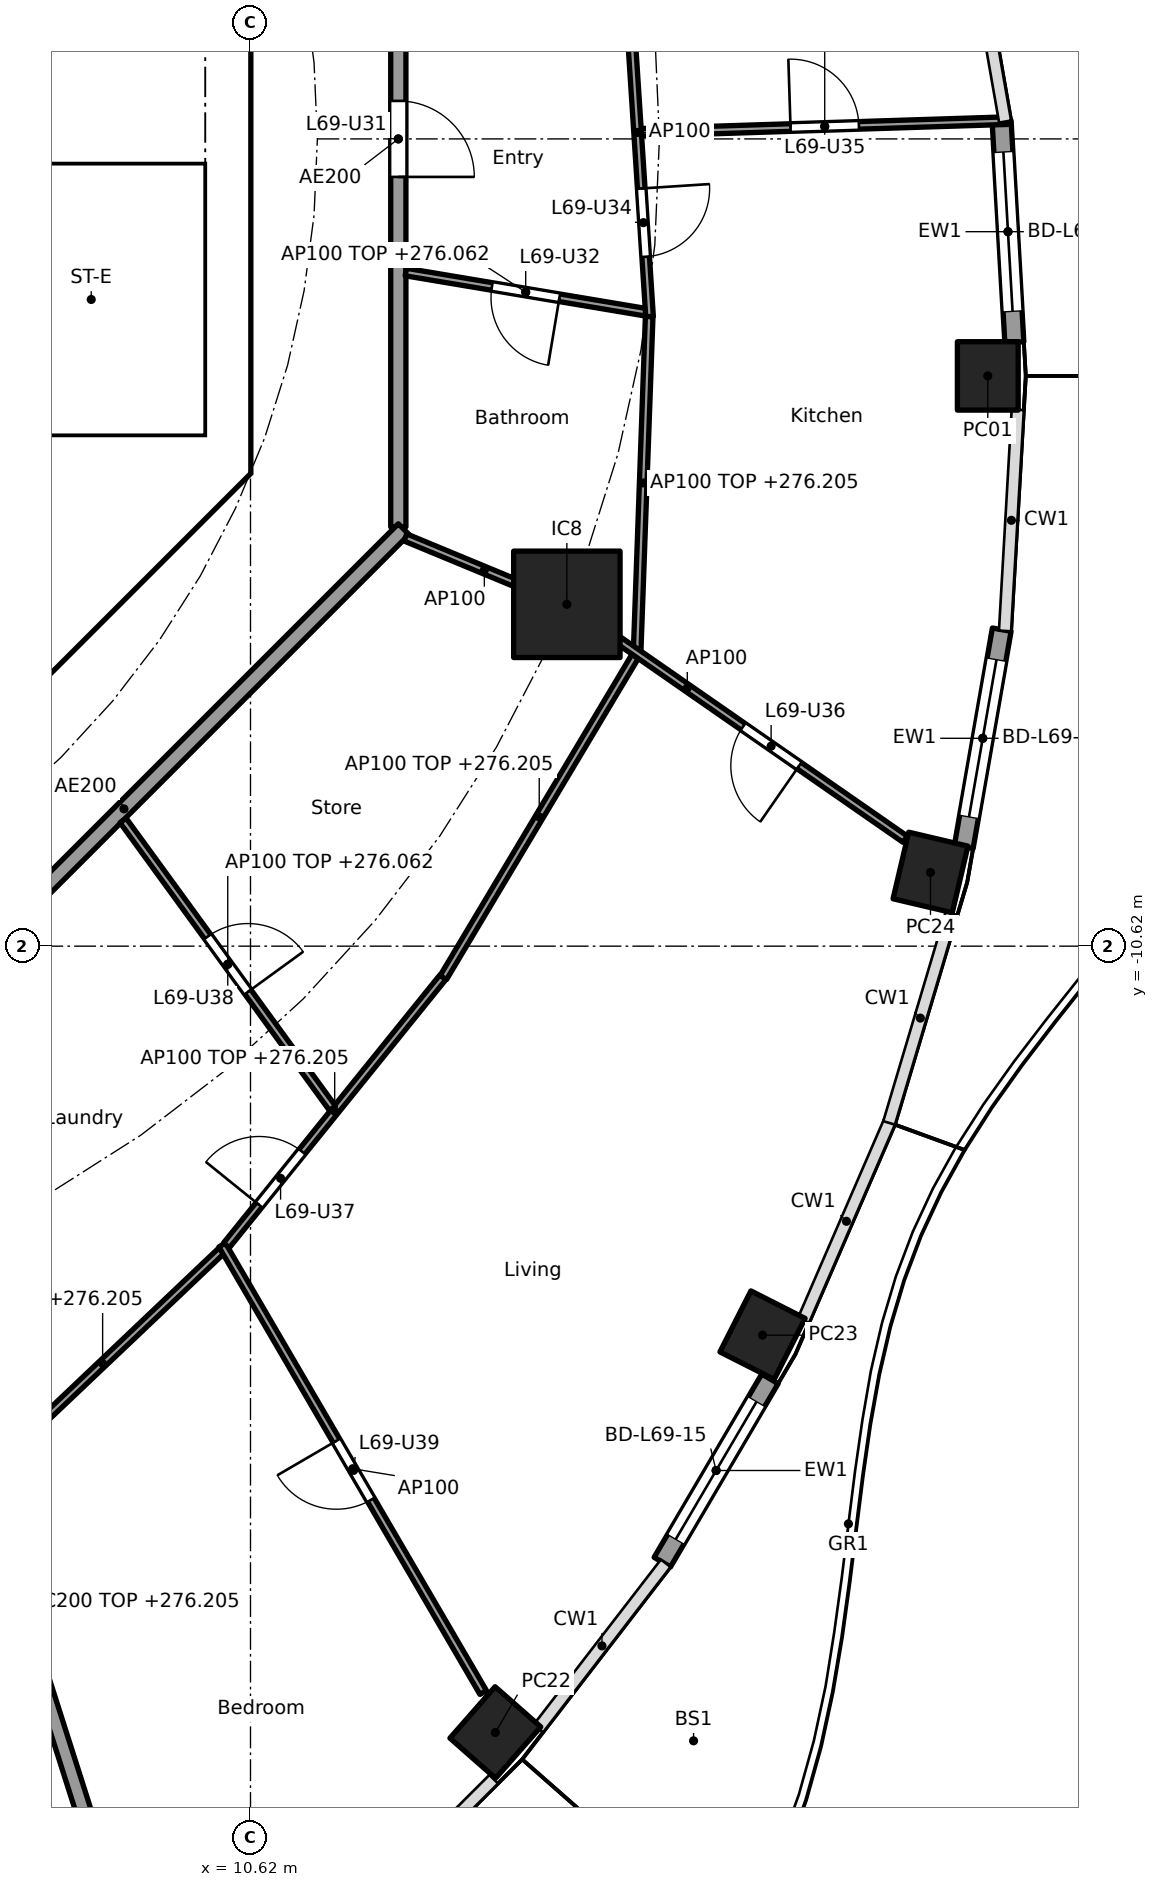
"""IFC4 building model, lengths in metres.
Left out: names, types, materials, properties, quantities, classifications, styles, units other than length and angle.
Written with IfcOpenShell. Run it as: python <this file> out.ifc"""

import sys

from ifc_helpers import new_model, si_unit, direction, frame, frame_2d, origin, origin_2d, place, context, subcontext, project, spatial, polyline, rectangle, hollow_rectangle, outline, extrude, element, fill, save


model = new_model("IFC4")
c1 = context("Model", 3, precision=1e-05, world=origin(), true_north=direction((0.0, 1.0)))
c2 = subcontext(c1, "Body", "Model", "MODEL_VIEW")
j1 = project(units=[si_unit("LENGTHUNIT", "METRE"), si_unit("PLANEANGLEUNIT", "RADIAN")], contexts=[c1])
p1 = place(None, origin())
s1 = spatial("IfcSite", under=j1, at=p1, CompositionType="ELEMENT")
p2 = place(p1, origin())
s2 = spatial("IfcBuilding", under=s1, at=p2, CompositionType="ELEMENT")
p3 = place(p2, frame((0.0, 0.0, 273.3)))
s3 = spatial("IfcBuildingStorey", under=s2, at=p3, CompositionType="ELEMENT", Elevation=273.3)
for number, where, z_axis, x_axis in (
    (1, (20.32, -3.118, 0.0), (0.0, 0.0, 1.0), (0.0, 1.0, 0.0)),
    (2, (13.841, -20.965, 0.0), (0.0, 0.0, 1.0), (0.66, 0.751, 0.0)),
    (3, (17.356, -15.738, 0.0), (0.0, 0.0, 1.0), (0.452, 0.892, 0.0)),
    (4, (19.566, -9.65, 0.0), (0.0, 0.0, 1.0), (0.229, 0.973, 0.0)),
):
    element("IfcColumn", number, at=place(p3, frame(where, z_axis=z_axis, x_axis=x_axis)), inside=s3, PredefinedType="COLUMN", context=c2, shape_type="SweptSolid", body=[
        extrude(hollow_rectangle(XDim=0.9, YDim=0.8, WallThickness=0.028, at=origin_2d()), origin(), (0.0, 0.0, 1.0), 3.7),
    ])
p4 = place(p3, frame((14.782, -6.123, 0.0), z_axis=(0.0, 0.0, 1.0), x_axis=(1.0, 0.0, 0.0)))
e5 = element("IfcColumn", 5, at=p4, inside=s3, PredefinedType="COLUMN", context=c2, shape_type="SweptSolid", body=[
    extrude(rectangle(XDim=1.4, YDim=1.4, at=origin_2d()), origin(), (0.0, 0.0, 1.0), 3.7),
])
p5 = place(p3, frame((20.502, 0.235, 0.0), z_axis=(0.0, 0.0, 1.0), x_axis=(0.057533933376, -0.998343551344, 0.0)))
e6 = element("IfcWall", 6, at=p5, inside=s3, PredefinedType="SOLIDWALL", context=c2, shape_type="SweptSolid", body=[
    extrude(rectangle(XDim=2.915, YDim=0.25, at=frame_2d((1.458, 0.0))), origin(), (0.0, 0.0, 1.0), 3.44),
])
p6 = place(p5, frame((0.408, 0.0, 0.0)))
e7 = element("IfcOpeningElement", 7, at=p6, cuts=e6, PredefinedType="OPENING", context=c2, shape_type="SweptSolid", body=[
    extrude(rectangle(XDim=2.1, YDim=2.4, at=frame_2d((1.05, 1.2))), frame((0.0, 0.135, 0.0), z_axis=(0.0, -1.0, 0.0), x_axis=(1.0, 0.0, 0.0)), (0.0, 0.0, 1.0), 0.27),
])
p7 = place(p3, frame((17.454, -16.312, 0.0), z_axis=(0.0, 0.0, 1.0), x_axis=(-0.506371364425, -0.862315511452, 0.0)))
e8 = element("IfcWall", 8, at=p7, inside=s3, PredefinedType="SOLIDWALL", context=c2, shape_type="SweptSolid", body=[
    extrude(rectangle(XDim=2.796, YDim=0.25, at=frame_2d((1.398, 0.0))), origin(), (0.0, 0.0, 1.0), 3.44),
])
p8 = place(p7, frame((0.348, 0.0, 0.0)))
e9 = element("IfcOpeningElement", 9, at=p8, cuts=e8, PredefinedType="OPENING", context=c2, shape_type="SweptSolid", body=[
    extrude(rectangle(XDim=2.1, YDim=2.4, at=frame_2d((1.05, 1.2))), frame((0.0, 0.135, 0.0), z_axis=(0.0, -1.0, 0.0), x_axis=(1.0, 0.0, 0.0)), (0.0, 0.0, 1.0), 0.27),
])
p9 = place(p3, frame((20.503, -6.456, 0.0), z_axis=(0.0, 0.0, 1.0), x_axis=(-0.172182411767, -0.985065082661, 0.0)))
e10 = element("IfcWall", 10, at=p9, inside=s3, PredefinedType="SOLIDWALL", context=c2, shape_type="SweptSolid", body=[
    extrude(rectangle(XDim=2.903, YDim=0.25, at=frame_2d((1.451, 0.0))), origin(), (0.0, 0.0, 1.0), 3.44),
])
p10 = place(p9, frame((0.401, 0.0, 0.0)))
e11 = element("IfcOpeningElement", 11, at=p10, cuts=e10, PredefinedType="OPENING", context=c2, shape_type="SweptSolid", body=[
    extrude(rectangle(XDim=2.1, YDim=2.4, at=frame_2d((1.05, 1.2))), frame((0.0, 0.135, 0.0), z_axis=(0.0, -1.0, 0.0), x_axis=(1.0, 0.0, 0.0)), (0.0, 0.0, 1.0), 0.27),
])
p11 = place(p3, frame((4.613, -9.988, 0.0), z_axis=(0.0, 0.0, 1.0), x_axis=(0.707106781187, 0.707106781187, 0.0)))
e12 = element("IfcWall", 12, at=p11, inside=s3, PredefinedType="SHEAR", context=c2, shape_type="SweptSolid", body=[
    extrude(rectangle(XDim=7.602, YDim=0.6, at=frame_2d((3.801, 0.0))), origin(), (0.0, 0.0, 1.0), 3.44),
])
p12 = place(p11, frame((3.201, 0.0, 0.0)))
e13 = element("IfcOpeningElement", 13, at=p12, cuts=e12, PredefinedType="OPENING", context=c2, shape_type="SweptSolid", body=[
    extrude(rectangle(XDim=1.2, YDim=2.1, at=frame_2d((0.6, 1.05))), frame((0.0, 0.31, 0.0), z_axis=(0.0, -1.0, 0.0), x_axis=(1.0, 0.0, 0.0)), (0.0, 0.0, 1.0), 0.62),
])
p13 = place(p3, origin())
e14 = element("IfcWall", 14, at=p13, inside=s3, PredefinedType="SHEAR", context=c2, shape_type="SweptSolid", body=[
    extrude(outline(polyline([(9.776, -4.401), (10.025, -4.152), (10.025, -3.801), (10.025, 4.152), (9.776, 4.401), (10.2, 4.825), (10.625, 4.401), (10.625, -4.401), (10.2, -4.825), (9.776, -4.401)])), origin(), (0.0, 0.0, 1.0), 3.44),
])
p14 = place(p3, origin())
e15 = element("IfcWall", 15, at=p14, inside=s3, PredefinedType="SOLIDWALL", context=c2, shape_type="SweptSolid", body=[
    extrude(outline(polyline([(10.025, -4.1), (6.7, -4.1), (6.7, -3.9), (10.025, -3.9), (10.025, -4.1)])), origin(), (0.0, 0.0, 1.0), 3.44),
])
p15 = place(p3, frame((6.138, -14.83, 0.0), z_axis=(0.0, 0.0, 1.0), x_axis=(0.303653679037, -0.952782474234, 0.0)))
e16 = element("IfcWall", 16, at=p15, inside=s3, PredefinedType="PARTITIONING", context=c2, shape_type="SweptSolid", body=[
    extrude(rectangle(XDim=10.076, YDim=0.2, at=frame_2d((5.038, 0.0))), origin(), (0.0, 0.0, 1.0), 2.905),
])
p16 = place(p3, frame((12.565, -5.104, 0.0), z_axis=(0.0, 0.0, 1.0), x_axis=(0.0, 1.0, 0.0)))
e17 = element("IfcWall", 17, at=p16, inside=s3, PredefinedType="PARTITIONING", context=c2, shape_type="SweptSolid", body=[
    extrude(rectangle(XDim=10.209, YDim=0.2, at=frame_2d((5.104, 0.0))), origin(), (0.0, 0.0, 1.0), 3.44),
])
p17 = place(p16, frame((4.604, 0.0, 0.0)))
e18 = element("IfcOpeningElement", 18, at=p17, cuts=e17, PredefinedType="OPENING", context=c2, shape_type="SweptSolid", body=[
    extrude(rectangle(XDim=1.0, YDim=2.1, at=frame_2d((0.5, 1.05))), frame((0.0, 0.11, 0.0), z_axis=(0.0, -1.0, 0.0), x_axis=(1.0, 0.0, 0.0)), (0.0, 0.0, 1.0), 0.22),
])
p18 = place(p3, frame((5.275, -12.494, 0.0), z_axis=(0.0, 0.0, 1.0), x_axis=(0.707106781187, 0.707106781187, 0.0)))
e19 = element("IfcWall", 19, at=p18, inside=s3, PredefinedType="PARTITIONING", context=c2, shape_type="SweptSolid", body=[
    extrude(rectangle(XDim=10.409, YDim=0.2, at=frame_2d((5.205, 0.0))), origin(), (0.0, 0.0, 1.0), 3.44),
])
p19 = place(p3, frame((12.663, -1.751, 0.0), z_axis=(0.0, 0.0, 1.0), x_axis=(0.98626156497, -0.165191178529, 0.0)))
e20 = element("IfcWall", 20, at=p19, inside=s3, PredefinedType="PARTITIONING", context=c2, shape_type="SweptSolid", body=[
    extrude(rectangle(XDim=3.198, YDim=0.1, at=frame_2d((1.599, 0.0))), origin(), (0.0, 0.0, 1.0), 2.762),
])
p20 = place(p19, frame((1.149, 0.0, 0.0)))
e21 = element("IfcOpeningElement", 21, at=p20, cuts=e20, PredefinedType="OPENING", context=c2, shape_type="SweptSolid", body=[
    extrude(rectangle(XDim=0.9, YDim=2.1, at=frame_2d((0.45, 1.05))), frame((0.0, 0.06, 0.0), z_axis=(0.0, -1.0, 0.0), x_axis=(1.0, 0.0, 0.0)), (0.0, 0.0, 1.0), 0.12),
])
p21 = place(p3, frame((15.87, -2.338, 0.0), z_axis=(0.0, 0.0, 1.0), x_axis=(-0.064797294757, 0.997898447034, 0.0)))
e22 = element("IfcWall", 22, at=p21, inside=s3, PredefinedType="PARTITIONING", context=c2, shape_type="SweptSolid", body=[
    extrude(rectangle(XDim=4.857, YDim=0.1, at=frame_2d((2.428, 0.0))), origin(), (0.0, 0.0, 1.0), 3.44),
])
p22 = place(p21, frame((0.789, 0.0, 0.0)))
e23 = element("IfcOpeningElement", 23, at=p22, cuts=e22, PredefinedType="OPENING", context=c2, shape_type="SweptSolid", body=[
    extrude(rectangle(XDim=0.9, YDim=2.1, at=frame_2d((0.45, 1.05))), frame((0.0, 0.06, 0.0), z_axis=(0.0, -1.0, 0.0), x_axis=(1.0, 0.0, 0.0)), (0.0, 0.0, 1.0), 0.12),
])
p23 = place(p3, frame((15.865, -2.338, 0.0), z_axis=(0.0, 0.0, 1.0), x_axis=(-0.035902310383, -0.999355304238, 0.0)))
e24 = element("IfcWall", 24, at=p23, inside=s3, PredefinedType="PARTITIONING", context=c2, shape_type="SweptSolid", body=[
    extrude(rectangle(XDim=4.379, YDim=0.1, at=frame_2d((2.19, 0.0))), origin(), (0.0, 0.0, 1.0), 2.905),
])
p24 = place(p3, frame((15.763, 0.087, 0.0), z_axis=(0.0, 0.0, 1.0), x_axis=(0.999492034598, 0.03186962151, 0.0)))
e25 = element("IfcWall", 25, at=p24, inside=s3, PredefinedType="PARTITIONING", context=c2, shape_type="SweptSolid", body=[
    extrude(rectangle(XDim=4.826, YDim=0.1, at=frame_2d((2.413, 0.0))), origin(), (0.0, 0.0, 1.0), 2.983),
])
p25 = place(p24, frame((1.963, 0.0, 0.0)))
e26 = element("IfcOpeningElement", 26, at=p25, cuts=e25, PredefinedType="OPENING", context=c2, shape_type="SweptSolid", body=[
    extrude(rectangle(XDim=0.9, YDim=2.1, at=frame_2d((0.45, 1.05))), frame((0.0, 0.06, 0.0), z_axis=(0.0, -1.0, 0.0), x_axis=(1.0, 0.0, 0.0)), (0.0, 0.0, 1.0), 0.12),
])
p26 = place(p3, frame((7.113, -17.592, 0.0), z_axis=(0.0, 0.0, 1.0), x_axis=(0.725433932329, 0.688291805723, 0.0)))
e27 = element("IfcWall", 27, at=p26, inside=s3, PredefinedType="PARTITIONING", context=c2, shape_type="SweptSolid", body=[
    extrude(rectangle(XDim=4.305, YDim=0.1, at=frame_2d((2.153, 0.0))), origin(), (0.0, 0.0, 1.0), 2.905),
])
p27 = place(p3, frame((10.248, -14.551, 0.0), z_axis=(0.0, 0.0, 1.0), x_axis=(0.503826483408, -0.86380488226, 0.0)))
e28 = element("IfcWall", 28, at=p27, inside=s3, PredefinedType="PARTITIONING", context=c2, shape_type="SweptSolid", body=[
    extrude(rectangle(XDim=6.816, YDim=0.1, at=frame_2d((3.408, 0.0))), origin(), (0.0, 0.0, 1.0), 3.44),
])
p28 = place(p27, frame((2.983, 0.0, 0.0)))
e29 = element("IfcOpeningElement", 29, at=p28, cuts=e28, PredefinedType="OPENING", context=c2, shape_type="SweptSolid", body=[
    extrude(rectangle(XDim=0.9, YDim=2.1, at=frame_2d((0.45, 1.05))), frame((0.0, 0.06, 0.0), z_axis=(0.0, -1.0, 0.0), x_axis=(1.0, 0.0, 0.0)), (0.0, 0.0, 1.0), 0.12),
])
p29 = place(p3, frame((10.304, -14.555, 0.0), z_axis=(0.0, 0.0, 1.0), x_axis=(0.628170338674, 0.778075848237, 0.0)))
e30 = element("IfcWall", 30, at=p29, inside=s3, PredefinedType="PARTITIONING", context=c2, shape_type="SweptSolid", body=[
    extrude(rectangle(XDim=4.532, YDim=0.1, at=frame_2d((2.266, 0.0))), origin(), (0.0, 0.0, 1.0), 2.905),
])
p30 = place(p29, frame((0.683, 0.0, 0.0)))
e31 = element("IfcOpeningElement", 31, at=p30, cuts=e30, PredefinedType="OPENING", context=c2, shape_type="SweptSolid", body=[
    extrude(rectangle(XDim=0.9, YDim=2.1, at=frame_2d((0.45, 1.05))), frame((0.0, 0.06, 0.0), z_axis=(0.0, -1.0, 0.0), x_axis=(1.0, 0.0, 0.0)), (0.0, 0.0, 1.0), 0.12),
])
p31 = place(p3, frame((8.943, -8.966, 0.0), z_axis=(0.0, 0.0, 1.0), x_axis=(0.588357698232, -0.808600778463, 0.0)))
e32 = element("IfcWall", 32, at=p31, inside=s3, PredefinedType="PARTITIONING", context=c2, shape_type="SweptSolid", body=[
    extrude(rectangle(XDim=4.682, YDim=0.1, at=frame_2d((2.341, 0.0))), origin(), (0.0, 0.0, 1.0), 2.762),
])
p32 = place(p31, frame((1.891, 0.0, 0.0)))
e33 = element("IfcOpeningElement", 33, at=p32, cuts=e32, PredefinedType="OPENING", context=c2, shape_type="SweptSolid", body=[
    extrude(rectangle(XDim=0.9, YDim=2.1, at=frame_2d((0.45, 1.05))), frame((0.0, 0.06, 0.0), z_axis=(0.0, -1.0, 0.0), x_axis=(1.0, 0.0, 0.0)), (0.0, 0.0, 1.0), 0.12),
])
p33 = place(p3, frame((13.157, -11.033, 0.0), z_axis=(0.0, 0.0, 1.0), x_axis=(0.512736548388, 0.858545998737, 0.0)))
e34 = element("IfcWall", 34, at=p33, inside=s3, PredefinedType="PARTITIONING", context=c2, shape_type="SweptSolid", body=[
    extrude(rectangle(XDim=4.922, YDim=0.1, at=frame_2d((2.461, 0.0))), origin(), (0.0, 0.0, 1.0), 2.905),
])
p34 = place(p3, frame((12.657, -5.243, 0.0), z_axis=(0.0, 0.0, 1.0), x_axis=(0.923864733477, -0.382719158442, 0.0)))
e35 = element("IfcWall", 35, at=p34, inside=s3, PredefinedType="PARTITIONING", context=c2, shape_type="SweptSolid", body=[
    extrude(rectangle(XDim=2.25, YDim=0.1, at=frame_2d((1.125, 0.0))), origin(), (0.0, 0.0, 1.0), 3.44),
])
p35 = place(p3, frame((14.823, -6.151, 0.0), z_axis=(0.0, 0.0, 1.0), x_axis=(0.821435065081, -0.570302054928, 0.0)))
e36 = element("IfcWall", 36, at=p35, inside=s3, PredefinedType="PARTITIONING", context=c2, shape_type="SweptSolid", body=[
    extrude(rectangle(XDim=5.368, YDim=0.1, at=frame_2d((2.684, 0.0))), origin(), (0.0, 0.0, 1.0), 3.44),
])
p36 = place(p35, frame((2.771, 0.0, 0.0)))
e37 = element("IfcOpeningElement", 37, at=p36, cuts=e36, PredefinedType="OPENING", context=c2, shape_type="SweptSolid", body=[
    extrude(rectangle(XDim=0.9, YDim=2.1, at=frame_2d((0.45, 1.05))), frame((0.0, 0.06, 0.0), z_axis=(0.0, -1.0, 0.0), x_axis=(1.0, 0.0, 0.0)), (0.0, 0.0, 1.0), 0.12),
])
p37 = place(p6, origin())
e38 = element("IfcDoor", 38, at=p37, inside=s3, OperationType="SLIDING_TO_LEFT", PredefinedType="DOOR", context=c2, shape_type="SweptSolid", body=[
    extrude(rectangle(XDim=2.1, YDim=2.4, at=frame_2d((1.05, 1.2))), frame((0.0, 0.025, 0.0), z_axis=(0.0, -1.0, 0.0), x_axis=(1.0, 0.0, 0.0)), (0.0, 0.0, 1.0), 0.05),
])
fill(e7, e38)
p38 = place(p8, origin())
e39 = element("IfcDoor", 39, at=p38, inside=s3, OperationType="SLIDING_TO_LEFT", PredefinedType="DOOR", context=c2, shape_type="SweptSolid", body=[
    extrude(rectangle(XDim=2.1, YDim=2.4, at=frame_2d((1.05, 1.2))), frame((0.0, 0.025, 0.0), z_axis=(0.0, -1.0, 0.0), x_axis=(1.0, 0.0, 0.0)), (0.0, 0.0, 1.0), 0.05),
])
fill(e9, e39)
p39 = place(p10, origin())
e40 = element("IfcDoor", 40, at=p39, inside=s3, OperationType="SLIDING_TO_LEFT", PredefinedType="DOOR", context=c2, shape_type="SweptSolid", body=[
    extrude(rectangle(XDim=2.1, YDim=2.4, at=frame_2d((1.05, 1.2))), frame((0.0, 0.025, 0.0), z_axis=(0.0, -1.0, 0.0), x_axis=(1.0, 0.0, 0.0)), (0.0, 0.0, 1.0), 0.05),
])
fill(e11, e40)
p40 = place(p17, frame((1.0, 0.0, 0.0), x_axis=(-1.0, 0.0, 0.0)))
e41 = element("IfcDoor", 41, at=p40, inside=s3, OperationType="SINGLE_SWING_RIGHT", PredefinedType="DOOR", context=c2, shape_type="SweptSolid", body=[
    extrude(rectangle(XDim=1.0, YDim=2.1, at=frame_2d((0.5, 1.05))), frame((0.0, 0.025, 0.0), z_axis=(0.0, -1.0, 0.0), x_axis=(1.0, 0.0, 0.0)), (0.0, 0.0, 1.0), 0.05),
])
fill(e18, e41)
p41 = place(p20, frame((0.9, 0.0, 0.0), x_axis=(-1.0, 0.0, 0.0)))
e42 = element("IfcDoor", 42, at=p41, inside=s3, OperationType="SINGLE_SWING_LEFT", PredefinedType="DOOR", context=c2, shape_type="SweptSolid", body=[
    extrude(rectangle(XDim=0.9, YDim=2.1, at=frame_2d((0.45, 1.05))), frame((0.0, 0.025, 0.0), z_axis=(0.0, -1.0, 0.0), x_axis=(1.0, 0.0, 0.0)), (0.0, 0.0, 1.0), 0.05),
])
fill(e21, e42)
p42 = place(p22, frame((0.9, 0.0, 0.0), x_axis=(-1.0, 0.0, 0.0)))
e43 = element("IfcDoor", 43, at=p42, inside=s3, OperationType="SINGLE_SWING_LEFT", PredefinedType="DOOR", context=c2, shape_type="SweptSolid", body=[
    extrude(rectangle(XDim=0.9, YDim=2.1, at=frame_2d((0.45, 1.05))), frame((0.0, 0.025, 0.0), z_axis=(0.0, -1.0, 0.0), x_axis=(1.0, 0.0, 0.0)), (0.0, 0.0, 1.0), 0.05),
])
fill(e23, e43)
p43 = place(p25, origin())
e44 = element("IfcDoor", 44, at=p43, inside=s3, OperationType="SINGLE_SWING_LEFT", PredefinedType="DOOR", context=c2, shape_type="SweptSolid", body=[
    extrude(rectangle(XDim=0.9, YDim=2.1, at=frame_2d((0.45, 1.05))), frame((0.0, 0.025, 0.0), z_axis=(0.0, -1.0, 0.0), x_axis=(1.0, 0.0, 0.0)), (0.0, 0.0, 1.0), 0.05),
])
fill(e26, e44)
p44 = place(p36, frame((0.9, 0.0, 0.0), x_axis=(-1.0, 0.0, 0.0)))
e45 = element("IfcDoor", 45, at=p44, inside=s3, OperationType="SINGLE_SWING_LEFT", PredefinedType="DOOR", context=c2, shape_type="SweptSolid", body=[
    extrude(rectangle(XDim=0.9, YDim=2.1, at=frame_2d((0.45, 1.05))), frame((0.0, 0.025, 0.0), z_axis=(0.0, -1.0, 0.0), x_axis=(1.0, 0.0, 0.0)), (0.0, 0.0, 1.0), 0.05),
])
fill(e37, e45)
p45 = place(p30, origin())
e46 = element("IfcDoor", 46, at=p45, inside=s3, OperationType="SINGLE_SWING_LEFT", PredefinedType="DOOR", context=c2, shape_type="SweptSolid", body=[
    extrude(rectangle(XDim=0.9, YDim=2.1, at=frame_2d((0.45, 1.05))), frame((0.0, 0.025, 0.0), z_axis=(0.0, -1.0, 0.0), x_axis=(1.0, 0.0, 0.0)), (0.0, 0.0, 1.0), 0.05),
])
fill(e31, e46)
p46 = place(p32, origin())
e47 = element("IfcDoor", 47, at=p46, inside=s3, OperationType="SINGLE_SWING_RIGHT", PredefinedType="DOOR", context=c2, shape_type="SweptSolid", body=[
    extrude(rectangle(XDim=0.9, YDim=2.1, at=frame_2d((0.45, 1.05))), frame((0.0, 0.025, 0.0), z_axis=(0.0, -1.0, 0.0), x_axis=(1.0, 0.0, 0.0)), (0.0, 0.0, 1.0), 0.05),
])
fill(e33, e47)
p47 = place(p28, frame((0.9, 0.0, 0.0), x_axis=(-1.0, 0.0, 0.0)))
e48 = element("IfcDoor", 48, at=p47, inside=s3, OperationType="SINGLE_SWING_RIGHT", PredefinedType="DOOR", context=c2, shape_type="SweptSolid", body=[
    extrude(rectangle(XDim=0.9, YDim=2.1, at=frame_2d((0.45, 1.05))), frame((0.0, 0.025, 0.0), z_axis=(0.0, -1.0, 0.0), x_axis=(1.0, 0.0, 0.0)), (0.0, 0.0, 1.0), 0.05),
])
fill(e29, e48)
save(model, sys.argv[1])
